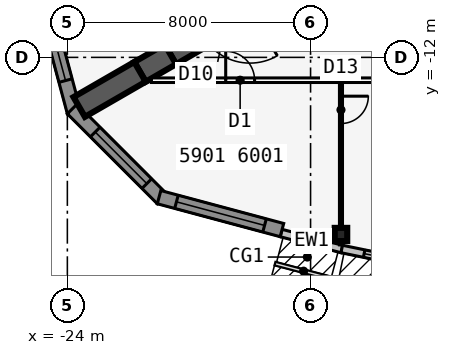
"""IFC4 building model, lengths in metres.
Left out: names, types, materials, properties, quantities, classifications, styles, units other than length and angle.
Written with IfcOpenShell. Run it as: python <this file> out.ifc"""

import sys

from ifc_helpers import new_model, si_unit, direction, frame, frame_2d, origin, origin_2d, place, context, subcontext, project, spatial, polyline, rectangle, i_section, outline, extrude, element, fill, save


model = new_model("IFC4")
c1 = context("Model", 3, precision=1e-05, world=origin(), true_north=direction((0.0, 1.0)))
c2 = subcontext(c1, "Body", "Model", "MODEL_VIEW")
j1 = project(units=[si_unit("LENGTHUNIT", "METRE"), si_unit("PLANEANGLEUNIT", "RADIAN")], contexts=[c1])
p1 = place(None, origin())
s1 = spatial("IfcSite", under=j1, at=p1, CompositionType="ELEMENT")
p2 = place(p1, origin())
s2 = spatial("IfcBuilding", under=s1, at=p2, CompositionType="ELEMENT")
p3 = place(p2, frame((0.0, 0.0, 222.5)))
s3 = spatial("IfcBuildingStorey", under=s2, at=p3, CompositionType="ELEMENT", Elevation=222.5)
p4 = place(p3, frame((-16.5, -9.526, 0.0), z_axis=(0.0, 0.0, 1.0), x_axis=(-0.866031398331, -0.499989616998, 0.0)))
e1 = element("IfcWall", 1, at=p4, inside=s3, PredefinedType="SHEAR", context=c2, shape_type="SweptSolid", body=[
    extrude(rectangle(XDim=4.746, YDim=0.75, at=frame_2d((2.373, 0.0))), origin(), (0.0, 0.0, 1.0), 3.6),
])
p5 = place(p4, frame((1.725, 0.0, 0.0)))
e2 = element("IfcOpeningElement", 2, at=p5, cuts=e1, PredefinedType="OPENING", context=c2, shape_type="SweptSolid", body=[
    extrude(rectangle(XDim=1.8, YDim=2.13, at=frame_2d((0.9, 1.065))), frame((0.0, 0.385, 0.0), z_axis=(0.0, -1.0, 0.0), x_axis=(1.0, 0.0, 0.0)), (0.0, 0.0, 1.0), 0.77),
])
p6 = place(p3, frame((-20.61, -11.899, 0.0), z_axis=(0.0, 0.0, 1.0), x_axis=(-0.866009537788, -0.500027479704, 0.0)))
e3 = element("IfcWall", 3, at=p6, inside=s3, PredefinedType="SHEAR", context=c2, shape_type="SweptSolid", body=[
    extrude(rectangle(XDim=1.155, YDim=0.75, at=frame_2d((0.577, 0.0))), origin(), (0.0, 0.0, 1.0), 3.6),
])
p7 = place(p3, frame((-21.61, -12.477, 0.0), z_axis=(0.0, 0.0, 1.0), x_axis=(-0.866055313784, -0.499948190782, 0.0)))
e4 = element("IfcWall", 4, at=p7, inside=s3, PredefinedType="SHEAR", context=c2, shape_type="SweptSolid", body=[
    extrude(rectangle(XDim=2.309, YDim=0.75, at=frame_2d((1.155, 0.0))), origin(), (0.0, 0.0, 1.0), 3.6),
])
p8 = place(p3, frame((-15.0, -17.825, 0.0), z_axis=(0.0, 0.0, 1.0), x_axis=(1.0, 0.0, 0.0)))
e5 = element("IfcColumn", 5, at=p8, inside=s3, PredefinedType="COLUMN", context=c2, shape_type="SweptSolid", body=[
    extrude(i_section(OverallWidth=0.411, OverallDepth=0.434, WebThickness=0.036, FlangeThickness=0.057, at=origin_2d()), origin(), (0.0, 0.0, 1.0), 3.6),
])
p9 = place(p3, frame((-16.968, -17.777, 0.0), z_axis=(0.0, 0.0, 1.0), x_axis=(0.967010286052, -0.254737328772, 0.0)))
e6 = element("IfcWall", 6, at=p9, inside=s3, PredefinedType="STANDARD", context=c2, shape_type="SweptSolid", body=[
    extrude(rectangle(XDim=2.068, YDim=0.25, at=frame_2d((1.034, 0.0))), origin(), (0.0, 0.0, 1.0), 3.435),
])
p10 = place(p3, frame((-14.975, -18.302, 0.0), z_axis=(0.0, 0.0, 1.0), x_axis=(0.979461488189, -0.201631329795, 0.0)))
e7 = element("IfcWall", 7, at=p10, inside=s3, PredefinedType="STANDARD", context=c2, shape_type="SweptSolid", body=[
    extrude(rectangle(XDim=5.105, YDim=0.25, at=frame_2d((2.552, 0.0))), origin(), (0.0, 0.0, 1.0), 3.435),
])
p11 = place(p10, frame((0.752, 0.0, 0.45)))
e8 = element("IfcOpeningElement", 8, at=p11, cuts=e7, PredefinedType="OPENING", context=c2, shape_type="SweptSolid", body=[
    extrude(rectangle(XDim=3.6, YDim=2.6, at=frame_2d((1.8, 1.3))), frame((0.0, 0.135, 0.0), z_axis=(0.0, -1.0, 0.0), x_axis=(1.0, 0.0, 0.0)), (0.0, 0.0, 1.0), 0.27),
])
p12 = place(p3, frame((-24.865, -9.757, 0.0), z_axis=(0.0, 0.0, 1.0), x_axis=(0.258799282522, -0.96593112144, 0.0)))
e9 = element("IfcWall", 9, at=p12, inside=s3, PredefinedType="SOLIDWALL", context=c2, shape_type="SweptSolid", body=[
    extrude(outline(polyline([(4.184, 0.225), (4.125, 0.225), (3.705, 0.113), (3.675, 0.225), (0.0, 0.225), (0.0, -0.225), (4.184, -0.225), (4.184, 0.225)])), origin(), (0.0, 0.0, 1.0), 3.435),
])
p13 = place(p12, frame((0.713, 0.0, 0.45)))
e10 = element("IfcOpeningElement", 10, at=p13, cuts=e9, PredefinedType="OPENING", context=c2, shape_type="SweptSolid", body=[
    extrude(rectangle(XDim=2.4, YDim=2.6, at=frame_2d((1.2, 1.3))), frame((0.0, 0.235, 0.0), z_axis=(0.0, -1.0, 0.0), x_axis=(1.0, 0.0, 0.0)), (0.0, 0.0, 1.0), 0.47),
])
p14 = place(p3, frame((-23.841, -13.697, 0.0), z_axis=(0.0, 0.0, 1.0), x_axis=(0.707077605902, -0.707135955267, 0.0)))
e11 = element("IfcWall", 11, at=p14, inside=s3, PredefinedType="SOLIDWALL", context=c2, shape_type="SweptSolid", body=[
    extrude(outline(polyline([(4.184, 0.225), (0.509, 0.225), (0.479, 0.113), (0.059, 0.225), (0.0, 0.225), (0.0, -0.225), (4.184, -0.225), (4.184, 0.225)])), origin(), (0.0, 0.0, 1.0), 3.435),
])
p15 = place(p14, frame((1.071, 0.0, 0.45)))
e12 = element("IfcOpeningElement", 12, at=p15, cuts=e11, PredefinedType="OPENING", context=c2, shape_type="SweptSolid", body=[
    extrude(rectangle(XDim=2.4, YDim=2.6, at=frame_2d((1.2, 1.3))), frame((0.0, 0.235, 0.0), z_axis=(0.0, -1.0, 0.0), x_axis=(1.0, 0.0, 0.0)), (0.0, 0.0, 1.0), 0.47),
])
p16 = place(p3, frame((-20.983, -16.598, 0.0), z_axis=(0.0, 0.0, 1.0), x_axis=(0.965920442324, -0.258839137498, 0.0)))
e13 = element("IfcWall", 13, at=p16, inside=s3, PredefinedType="SOLIDWALL", context=c2, shape_type="SweptSolid", body=[
    extrude(rectangle(XDim=4.184, YDim=0.45, at=frame_2d((2.092, 0.0))), origin(), (0.0, 0.0, 1.0), 3.435),
])
p17 = place(p16, frame((0.592, 0.0, 0.45)))
e14 = element("IfcOpeningElement", 14, at=p17, cuts=e13, PredefinedType="OPENING", context=c2, shape_type="SweptSolid", body=[
    extrude(rectangle(XDim=3.0, YDim=2.6, at=frame_2d((1.5, 1.3))), frame((0.0, 0.235, 0.0), z_axis=(0.0, -1.0, 0.0), x_axis=(1.0, 0.0, 0.0)), (0.0, 0.0, 1.0), 0.47),
])
p18 = place(p3, frame((-21.236, -12.751, 0.0), z_axis=(0.0, 0.0, 1.0), x_axis=(1.0, 0.0, 0.0)))
e15 = element("IfcWall", 15, at=p18, inside=s3, PredefinedType="PARTITIONING", context=c2, shape_type="SweptSolid", body=[
    extrude(rectangle(XDim=42.472, YDim=0.15, at=frame_2d((21.236, 0.0))), origin(), (0.0, 0.0, 1.0), 3.435),
])
p19 = place(p18, frame((2.444, 0.0, 0.0)))
e16 = element("IfcOpeningElement", 16, at=p19, cuts=e15, PredefinedType="OPENING", context=c2, shape_type="SweptSolid", body=[
    extrude(rectangle(XDim=0.95, YDim=2.13, at=frame_2d((0.475, 1.065))), frame((0.0, 0.085, 0.0), z_axis=(0.0, -1.0, 0.0), x_axis=(1.0, 0.0, 0.0)), (0.0, 0.0, 1.0), 0.17),
])
p20 = place(p18, frame((13.261, 0.0, 0.0)))
e17 = element("IfcOpeningElement", 17, at=p20, cuts=e15, PredefinedType="OPENING", context=c2, shape_type="SweptSolid", body=[
    extrude(rectangle(XDim=0.95, YDim=2.13, at=frame_2d((0.475, 1.065))), frame((0.0, 0.085, 0.0), z_axis=(0.0, -1.0, 0.0), x_axis=(1.0, 0.0, 0.0)), (0.0, 0.0, 1.0), 0.17),
])
p21 = place(p18, frame((23.236, 0.0, 0.0)))
e18 = element("IfcOpeningElement", 18, at=p21, cuts=e15, PredefinedType="OPENING", context=c2, shape_type="SweptSolid", body=[
    extrude(rectangle(XDim=1.0, YDim=2.13, at=frame_2d((0.5, 1.065))), frame((0.0, 0.085, 0.0), z_axis=(0.0, -1.0, 0.0), x_axis=(1.0, 0.0, 0.0)), (0.0, 0.0, 1.0), 0.17),
])
p22 = place(p18, frame((29.461, 0.0, 0.0)))
e19 = element("IfcOpeningElement", 19, at=p22, cuts=e15, PredefinedType="OPENING", context=c2, shape_type="SweptSolid", body=[
    extrude(rectangle(XDim=0.95, YDim=2.13, at=frame_2d((0.475, 1.065))), frame((0.0, 0.085, 0.0), z_axis=(0.0, -1.0, 0.0), x_axis=(1.0, 0.0, 0.0)), (0.0, 0.0, 1.0), 0.17),
])
p23 = place(p18, frame((39.077, 0.0, 0.0)))
e20 = element("IfcOpeningElement", 20, at=p23, cuts=e15, PredefinedType="OPENING", context=c2, shape_type="SweptSolid", body=[
    extrude(rectangle(XDim=0.95, YDim=2.13, at=frame_2d((0.475, 1.065))), frame((0.0, 0.085, 0.0), z_axis=(0.0, -1.0, 0.0), x_axis=(1.0, 0.0, 0.0)), (0.0, 0.0, 1.0), 0.17),
])
p24 = place(p3, frame((-15.0, -12.826, 0.0), z_axis=(0.0, 0.0, 1.0), x_axis=(0.0, -1.0, 0.0)))
e21 = element("IfcWall", 21, at=p24, inside=s3, PredefinedType="PARTITIONING", context=c2, shape_type="SweptSolid", body=[
    extrude(rectangle(XDim=5.34, YDim=0.1, at=frame_2d((2.67, 0.0))), origin(), (0.0, 0.0, 1.0), 2.589),
])
p25 = place(p24, frame((0.45, 0.0, 0.0)))
e22 = element("IfcOpeningElement", 22, at=p25, cuts=e21, PredefinedType="OPENING", context=c2, shape_type="SweptSolid", body=[
    extrude(rectangle(XDim=0.9, YDim=2.13, at=frame_2d((0.45, 1.065))), frame((0.0, 0.06, 0.0), z_axis=(0.0, -1.0, 0.0), x_axis=(1.0, 0.0, 0.0)), (0.0, 0.0, 1.0), 0.12),
])
p26 = place(p11, origin())
e23 = element("IfcWindow", 23, at=p26, inside=s3, PartitioningType="SINGLE_PANEL", PredefinedType="WINDOW", context=c2, shape_type="SweptSolid", body=[
    extrude(rectangle(XDim=3.6, YDim=2.6, at=frame_2d((1.8, 1.3))), frame((0.0, 0.03, 0.0), z_axis=(0.0, -1.0, 0.0), x_axis=(1.0, 0.0, 0.0)), (0.0, 0.0, 1.0), 0.06),
])
fill(e8, e23)
p27 = place(p13, origin())
e24 = element("IfcWindow", 24, at=p27, inside=s3, PartitioningType="SINGLE_PANEL", PredefinedType="WINDOW", context=c2, shape_type="SweptSolid", body=[
    extrude(rectangle(XDim=2.4, YDim=2.6, at=frame_2d((1.2, 1.3))), frame((0.0, 0.03, 0.0), z_axis=(0.0, -1.0, 0.0), x_axis=(1.0, 0.0, 0.0)), (0.0, 0.0, 1.0), 0.06),
])
fill(e10, e24)
p28 = place(p15, origin())
e25 = element("IfcWindow", 25, at=p28, inside=s3, PartitioningType="SINGLE_PANEL", PredefinedType="WINDOW", context=c2, shape_type="SweptSolid", body=[
    extrude(rectangle(XDim=2.4, YDim=2.6, at=frame_2d((1.2, 1.3))), frame((0.0, 0.03, 0.0), z_axis=(0.0, -1.0, 0.0), x_axis=(1.0, 0.0, 0.0)), (0.0, 0.0, 1.0), 0.06),
])
fill(e12, e25)
p29 = place(p17, origin())
e26 = element("IfcWindow", 26, at=p29, inside=s3, PartitioningType="SINGLE_PANEL", PredefinedType="WINDOW", context=c2, shape_type="SweptSolid", body=[
    extrude(rectangle(XDim=3.0, YDim=2.6, at=frame_2d((1.5, 1.3))), frame((0.0, 0.03, 0.0), z_axis=(0.0, -1.0, 0.0), x_axis=(1.0, 0.0, 0.0)), (0.0, 0.0, 1.0), 0.06),
])
fill(e14, e26)
p30 = place(p25, origin())
e27 = element("IfcDoor", 27, at=p30, inside=s3, OperationType="SINGLE_SWING_LEFT", PredefinedType="DOOR", context=c2, shape_type="SweptSolid", body=[
    extrude(rectangle(XDim=0.9, YDim=2.13, at=frame_2d((0.45, 1.065))), frame((0.0, 0.025, 0.0), z_axis=(0.0, -1.0, 0.0), x_axis=(1.0, 0.0, 0.0)), (0.0, 0.0, 1.0), 0.05),
])
fill(e22, e27)
p31 = place(p19, origin())
e28 = element("IfcDoor", 28, at=p31, inside=s3, OperationType="SINGLE_SWING_LEFT", PredefinedType="DOOR", context=c2, shape_type="SweptSolid", body=[
    extrude(rectangle(XDim=0.95, YDim=2.13, at=frame_2d((0.475, 1.065))), frame((0.0, 0.025, 0.0), z_axis=(0.0, -1.0, 0.0), x_axis=(1.0, 0.0, 0.0)), (0.0, 0.0, 1.0), 0.05),
])
fill(e16, e28)
save(model, sys.argv[1])
